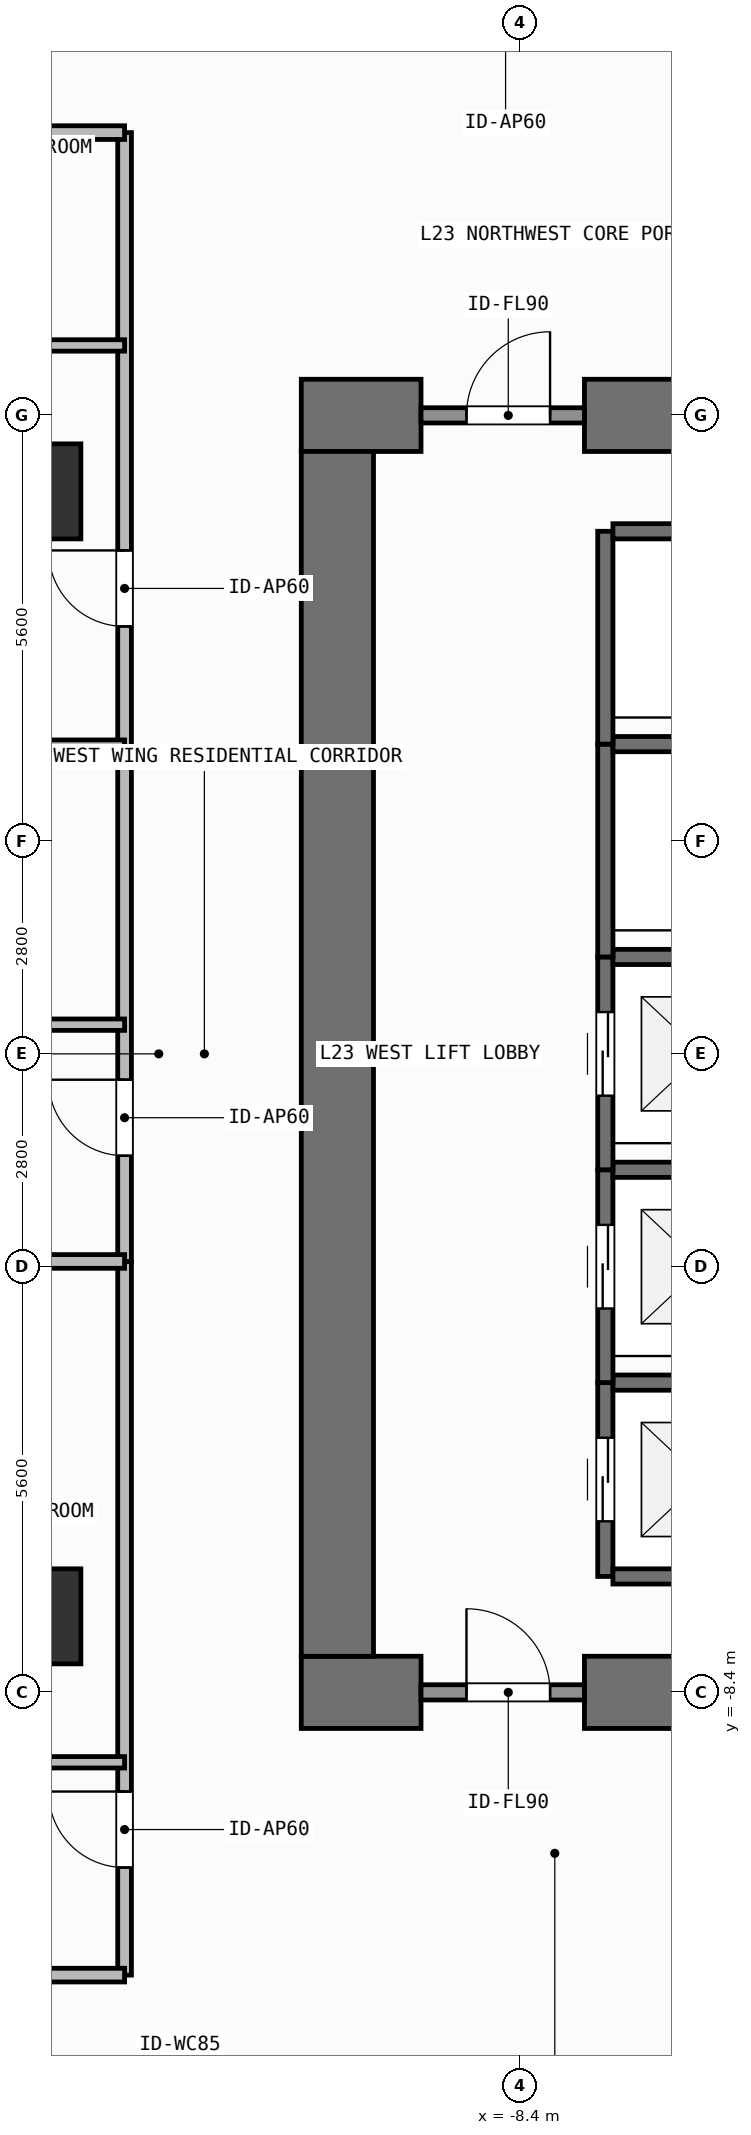
"""IFC4 building model, lengths in metres.
Left out: names, types, materials, properties, quantities, classifications, styles, units other than length and angle.
Written with IfcOpenShell. Run it as: python <this file> out.ifc"""

import sys

from ifc_helpers import new_model, si_unit, direction, frame, frame_2d, origin, origin_2d, place, context, subcontext, project, spatial, rectangle, extrude, element, fill, save


model = new_model("IFC4")
c1 = context("Model", 3, precision=1e-05, world=origin(), true_north=direction((0.0, 1.0)))
c2 = subcontext(c1, "Body", "Model", "MODEL_VIEW")
j1 = project(units=[si_unit("LENGTHUNIT", "METRE"), si_unit("PLANEANGLEUNIT", "RADIAN")], contexts=[c1])
p1 = place(None, origin())
s1 = spatial("IfcSite", under=j1, at=p1, CompositionType="ELEMENT")
p2 = place(p1, origin())
s2 = spatial("IfcBuilding", under=s1, at=p2, CompositionType="ELEMENT")
p3 = place(p2, frame((0.0, 0.0, 93.0)))
s3 = spatial("IfcBuildingStorey", under=s2, at=p3, CompositionType="ELEMENT", Elevation=93.0)
p4 = place(p3, frame((-11.275, -8.4, 0.0), z_axis=(0.0, 0.0, 1.0), x_axis=(1.0, 0.0, 0.0)))
e1 = element("IfcWall", 1, at=p4, inside=s3, PredefinedType="SHEAR", context=c2, shape_type="SweptSolid", body=[
    extrude(rectangle(XDim=1.575, YDim=0.95, at=frame_2d((0.788, 0.0))), origin(), (0.0, 0.0, 1.0), 3.9),
])
p5 = place(p3, frame((-7.55, -8.4, 0.0), z_axis=(0.0, 0.0, 1.0), x_axis=(1.0, 0.0, 0.0)))
e2 = element("IfcWall", 2, at=p5, inside=s3, PredefinedType="SHEAR", context=c2, shape_type="SweptSolid", body=[
    extrude(rectangle(XDim=3.35, YDim=0.95, at=frame_2d((1.675, 0.0))), origin(), (0.0, 0.0, 1.0), 3.9),
])
p6 = place(p3, frame((-11.275, 8.4, 0.0), z_axis=(0.0, 0.0, 1.0), x_axis=(1.0, 0.0, 0.0)))
e3 = element("IfcWall", 3, at=p6, inside=s3, PredefinedType="SHEAR", context=c2, shape_type="SweptSolid", body=[
    extrude(rectangle(XDim=1.575, YDim=0.95, at=frame_2d((0.788, 0.0))), origin(), (0.0, 0.0, 1.0), 3.9),
])
p7 = place(p3, frame((-7.55, 8.4, 0.0), z_axis=(0.0, 0.0, 1.0), x_axis=(1.0, 0.0, 0.0)))
e4 = element("IfcWall", 4, at=p7, inside=s3, PredefinedType="SHEAR", context=c2, shape_type="SweptSolid", body=[
    extrude(rectangle(XDim=16.425, YDim=0.95, at=frame_2d((8.212, 0.0))), origin(), (0.0, 0.0, 1.0), 3.9),
])
p8 = place(p3, frame((-10.8, -7.925, 0.0), z_axis=(0.0, 0.0, 1.0), x_axis=(0.0, 1.0, 0.0)))
e5 = element("IfcWall", 5, at=p8, inside=s3, PredefinedType="SHEAR", context=c2, shape_type="SweptSolid", body=[
    extrude(rectangle(XDim=15.85, YDim=0.95, at=frame_2d((7.925, 0.0))), origin(), (0.0, 0.0, 1.0), 3.9),
])
for number, where, z_axis, x_axis in (
    (6, (-14.8, -7.4, 0.0), (0.0, 0.0, 1.0), (1.0, 0.0, 0.0)),
    (7, (-14.8, 7.4, 0.0), (0.0, 0.0, 1.0), (1.0, 0.0, 0.0)),
):
    element("IfcColumn", number, at=place(p3, frame(where, z_axis=z_axis, x_axis=x_axis)), inside=s3, PredefinedType="COLUMN", context=c2, shape_type="SweptSolid", body=[
        extrude(rectangle(XDim=1.25, YDim=1.25, at=origin_2d()), origin(), (0.0, 0.0, 1.0), 3.9),
    ])
p9 = place(p3, frame((-7.275, -6.875, 0.0), z_axis=(0.0, 0.0, 1.0), x_axis=(0.0, 1.0, 0.0)))
e8 = element("IfcWall", 8, at=p9, inside=s3, PredefinedType="SHEAR", context=c2, shape_type="SweptSolid", body=[
    extrude(rectangle(XDim=2.55, YDim=0.2, at=frame_2d((1.275, 0.0))), origin(), (0.0, 0.0, 1.0), 3.68),
])
p10 = place(p9, frame((0.725, 0.0, 0.0)))
e9 = element("IfcOpeningElement", 9, at=p10, cuts=e8, PredefinedType="OPENING", context=c2, shape_type="SweptSolid", body=[
    extrude(rectangle(XDim=1.1, YDim=2.2, at=frame_2d((0.55, 1.1))), frame((0.0, 0.11, 0.0), z_axis=(0.0, -1.0, 0.0), x_axis=(1.0, 0.0, 0.0)), (0.0, 0.0, 1.0), 0.22),
])
for number, where, z_axis, x_axis in (
    (10, (-7.175, -6.875, 0.0), (0.0, 0.0, 1.0), (1.0, 0.0, 0.0)),
    (11, (-7.175, -4.325, 0.0), (0.0, 0.0, 1.0), (1.0, 0.0, 0.0)),
):
    element("IfcWall", number, at=place(p3, frame(where, z_axis=z_axis, x_axis=x_axis)), inside=s3, PredefinedType="SHEAR", context=c2, shape_type="SweptSolid", body=[
        extrude(rectangle(XDim=2.35, YDim=0.2, at=frame_2d((1.175, 0.0))), origin(), (0.0, 0.0, 1.0), 3.68),
    ])
p11 = place(p3, frame((-7.275, -4.325, 0.0), z_axis=(0.0, 0.0, 1.0), x_axis=(0.0, 1.0, 0.0)))
e12 = element("IfcWall", 12, at=p11, inside=s3, PredefinedType="SHEAR", context=c2, shape_type="SweptSolid", body=[
    extrude(rectangle(XDim=2.8, YDim=0.2, at=frame_2d((1.4, 0.0))), origin(), (0.0, 0.0, 1.0), 3.68),
])
p12 = place(p11, frame((0.975, 0.0, 0.0)))
e13 = element("IfcOpeningElement", 13, at=p12, cuts=e12, PredefinedType="OPENING", context=c2, shape_type="SweptSolid", body=[
    extrude(rectangle(XDim=1.1, YDim=2.2, at=frame_2d((0.55, 1.1))), frame((0.0, 0.11, 0.0), z_axis=(0.0, -1.0, 0.0), x_axis=(1.0, 0.0, 0.0)), (0.0, 0.0, 1.0), 0.22),
])
p13 = place(p3, frame((-7.175, -1.525, 0.0), z_axis=(0.0, 0.0, 1.0), x_axis=(1.0, 0.0, 0.0)))
e14 = element("IfcWall", 14, at=p13, inside=s3, PredefinedType="SHEAR", context=c2, shape_type="SweptSolid", body=[
    extrude(rectangle(XDim=2.35, YDim=0.2, at=frame_2d((1.175, 0.0))), origin(), (0.0, 0.0, 1.0), 3.68),
])
p14 = place(p3, frame((-7.275, -1.525, 0.0), z_axis=(0.0, 0.0, 1.0), x_axis=(0.0, 1.0, 0.0)))
e15 = element("IfcWall", 15, at=p14, inside=s3, PredefinedType="SHEAR", context=c2, shape_type="SweptSolid", body=[
    extrude(rectangle(XDim=2.8, YDim=0.2, at=frame_2d((1.4, 0.0))), origin(), (0.0, 0.0, 1.0), 3.68),
])
p15 = place(p14, frame((0.975, 0.0, 0.0)))
e16 = element("IfcOpeningElement", 16, at=p15, cuts=e15, PredefinedType="OPENING", context=c2, shape_type="SweptSolid", body=[
    extrude(rectangle(XDim=1.1, YDim=2.2, at=frame_2d((0.55, 1.1))), frame((0.0, 0.11, 0.0), z_axis=(0.0, -1.0, 0.0), x_axis=(1.0, 0.0, 0.0)), (0.0, 0.0, 1.0), 0.22),
])
p16 = place(p3, frame((-7.175, 1.275, 0.0), z_axis=(0.0, 0.0, 1.0), x_axis=(1.0, 0.0, 0.0)))
e17 = element("IfcWall", 17, at=p16, inside=s3, PredefinedType="SHEAR", context=c2, shape_type="SweptSolid", body=[
    extrude(rectangle(XDim=2.35, YDim=0.2, at=frame_2d((1.175, 0.0))), origin(), (0.0, 0.0, 1.0), 3.68),
])
p17 = place(p3, frame((-7.275, 1.275, 0.0), z_axis=(0.0, 0.0, 1.0), x_axis=(0.0, 1.0, 0.0)))
e18 = element("IfcWall", 18, at=p17, inside=s3, PredefinedType="SHEAR", context=c2, shape_type="SweptSolid", body=[
    extrude(rectangle(XDim=2.8, YDim=0.2, at=frame_2d((1.4, 0.0))), origin(), (0.0, 0.0, 1.0), 3.68),
])
p18 = place(p3, frame((-7.175, 4.075, 0.0), z_axis=(0.0, 0.0, 1.0), x_axis=(1.0, 0.0, 0.0)))
e19 = element("IfcWall", 19, at=p18, inside=s3, PredefinedType="SHEAR", context=c2, shape_type="SweptSolid", body=[
    extrude(rectangle(XDim=2.35, YDim=0.2, at=frame_2d((1.175, 0.0))), origin(), (0.0, 0.0, 1.0), 3.68),
])
p19 = place(p3, frame((-7.275, 4.075, 0.0), z_axis=(0.0, 0.0, 1.0), x_axis=(0.0, 1.0, 0.0)))
e20 = element("IfcWall", 20, at=p19, inside=s3, PredefinedType="SHEAR", context=c2, shape_type="SweptSolid", body=[
    extrude(rectangle(XDim=2.8, YDim=0.2, at=frame_2d((1.4, 0.0))), origin(), (0.0, 0.0, 1.0), 3.68),
])
p20 = place(p3, frame((-7.175, 6.875, 0.0), z_axis=(0.0, 0.0, 1.0), x_axis=(1.0, 0.0, 0.0)))
e21 = element("IfcWall", 21, at=p20, inside=s3, PredefinedType="SHEAR", context=c2, shape_type="SweptSolid", body=[
    extrude(rectangle(XDim=2.35, YDim=0.2, at=frame_2d((1.175, 0.0))), origin(), (0.0, 0.0, 1.0), 3.68),
])
p21 = place(p3, frame((-9.7, -8.4, 0.0), z_axis=(0.0, 0.0, 1.0), x_axis=(1.0, 0.0, 0.0)))
e22 = element("IfcWall", 22, at=p21, inside=s3, PredefinedType="SOLIDWALL", context=c2, shape_type="SweptSolid", body=[
    extrude(rectangle(XDim=2.15, YDim=0.2, at=frame_2d((1.075, 0.0))), origin(), (0.0, 0.0, 1.0), 2.72),
])
p22 = place(p21, frame((0.598, 0.0, 0.0)))
e23 = element("IfcOpeningElement", 23, at=p22, cuts=e22, PredefinedType="OPENING", context=c2, shape_type="SweptSolid", body=[
    extrude(rectangle(XDim=1.1, YDim=2.15, at=frame_2d((0.55, 1.075))), frame((0.0, 0.11, 0.0), z_axis=(0.0, -1.0, 0.0), x_axis=(1.0, 0.0, 0.0)), (0.0, 0.0, 1.0), 0.22),
])
p23 = place(p3, frame((-9.7, 8.4, 0.0), z_axis=(0.0, 0.0, 1.0), x_axis=(1.0, 0.0, 0.0)))
e24 = element("IfcWall", 24, at=p23, inside=s3, PredefinedType="SOLIDWALL", context=c2, shape_type="SweptSolid", body=[
    extrude(rectangle(XDim=2.15, YDim=0.2, at=frame_2d((1.075, 0.0))), origin(), (0.0, 0.0, 1.0), 2.72),
])
p24 = place(p23, frame((0.598, 0.0, 0.0)))
e25 = element("IfcOpeningElement", 25, at=p24, cuts=e24, PredefinedType="OPENING", context=c2, shape_type="SweptSolid", body=[
    extrude(rectangle(XDim=1.1, YDim=2.15, at=frame_2d((0.55, 1.075))), frame((0.0, 0.11, 0.0), z_axis=(0.0, -1.0, 0.0), x_axis=(1.0, 0.0, 0.0)), (0.0, 0.0, 1.0), 0.22),
])
p25 = place(p3, frame((-13.6, -12.12, 0.0), z_axis=(0.0, 0.0, 1.0), x_axis=(0.0, 1.0, 0.0)))
e26 = element("IfcWall", 26, at=p25, inside=s3, PredefinedType="PARTITIONING", context=c2, shape_type="SweptSolid", body=[
    extrude(rectangle(XDim=9.389, YDim=0.18, at=frame_2d((4.695, 0.0))), origin(), (0.0, 0.0, 1.0), 3.68),
])
p26 = place(p25, frame((1.415, 0.0, 0.0)))
e27 = element("IfcOpeningElement", 27, at=p26, cuts=e26, PredefinedType="OPENING", context=c2, shape_type="SweptSolid", body=[
    extrude(rectangle(XDim=1.0, YDim=2.2, at=frame_2d((0.5, 1.1))), frame((0.0, 0.1, 0.0), z_axis=(0.0, -1.0, 0.0), x_axis=(1.0, 0.0, 0.0)), (0.0, 0.0, 1.0), 0.2),
])
p27 = place(p3, frame((-16.863, -9.32, 0.0), z_axis=(0.0, 0.0, 1.0), x_axis=(1.0, 0.0, 0.0)))
e28 = element("IfcWall", 28, at=p27, inside=s3, PredefinedType="PARTITIONING", context=c2, shape_type="SweptSolid", body=[
    extrude(rectangle(XDim=3.263, YDim=0.15, at=frame_2d((1.631, 0.0))), origin(), (0.0, 0.0, 1.0), 3.68),
])
p28 = place(p27, frame((0.509, 0.0, 0.0)))
e29 = element("IfcOpeningElement", 29, at=p28, cuts=e28, PredefinedType="OPENING", context=c2, shape_type="SweptSolid", body=[
    extrude(rectangle(XDim=0.85, YDim=2.1, at=frame_2d((0.425, 1.05))), frame((0.0, 0.085, 0.0), z_axis=(0.0, -1.0, 0.0), x_axis=(1.0, 0.0, 0.0)), (0.0, 0.0, 1.0), 0.17),
])
p29 = place(p3, frame((-13.6, -2.731, 0.0), z_axis=(0.0, 0.0, 1.0), x_axis=(0.0, 1.0, 0.0)))
e30 = element("IfcWall", 30, at=p29, inside=s3, PredefinedType="PARTITIONING", context=c2, shape_type="SweptSolid", body=[
    extrude(rectangle(XDim=6.771, YDim=0.18, at=frame_2d((3.385, 0.0))), origin(), (0.0, 0.0, 1.0), 3.68),
])
p30 = place(p29, frame((1.391, 0.0, 0.0)))
e31 = element("IfcOpeningElement", 31, at=p30, cuts=e30, PredefinedType="OPENING", context=c2, shape_type="SweptSolid", body=[
    extrude(rectangle(XDim=1.0, YDim=2.2, at=frame_2d((0.5, 1.1))), frame((0.0, 0.1, 0.0), z_axis=(0.0, -1.0, 0.0), x_axis=(1.0, 0.0, 0.0)), (0.0, 0.0, 1.0), 0.2),
])
p31 = place(p3, frame((-16.902, 0.384, 0.0), z_axis=(0.0, 0.0, 1.0), x_axis=(1.0, 0.0, 0.0)))
e32 = element("IfcWall", 32, at=p31, inside=s3, PredefinedType="PARTITIONING", context=c2, shape_type="SweptSolid", body=[
    extrude(rectangle(XDim=3.302, YDim=0.15, at=frame_2d((1.651, 0.0))), origin(), (0.0, 0.0, 1.0), 3.68),
])
p32 = place(p31, frame((1.226, 0.0, 0.0)))
e33 = element("IfcOpeningElement", 33, at=p32, cuts=e32, PredefinedType="OPENING", context=c2, shape_type="SweptSolid", body=[
    extrude(rectangle(XDim=0.85, YDim=2.1, at=frame_2d((0.425, 1.05))), frame((0.0, 0.085, 0.0), z_axis=(0.0, -1.0, 0.0), x_axis=(1.0, 0.0, 0.0)), (0.0, 0.0, 1.0), 0.17),
])
p33 = place(p3, frame((-13.6, 4.04, 0.0), z_axis=(0.0, 0.0, 1.0), x_axis=(0.0, 1.0, 0.0)))
e34 = element("IfcWall", 34, at=p33, inside=s3, PredefinedType="PARTITIONING", context=c2, shape_type="SweptSolid", body=[
    extrude(rectangle(XDim=8.08, YDim=0.18, at=frame_2d((4.04, 0.0))), origin(), (0.0, 0.0, 1.0), 3.68),
])
p34 = place(p33, frame((1.583, 0.0, 0.0)))
e35 = element("IfcOpeningElement", 35, at=p34, cuts=e34, PredefinedType="OPENING", context=c2, shape_type="SweptSolid", body=[
    extrude(rectangle(XDim=1.0, YDim=2.2, at=frame_2d((0.5, 1.1))), frame((0.0, 0.1, 0.0), z_axis=(0.0, -1.0, 0.0), x_axis=(1.0, 0.0, 0.0)), (0.0, 0.0, 1.0), 0.2),
])
p35 = place(p3, frame((-16.902, 9.32, 0.0), z_axis=(0.0, 0.0, 1.0), x_axis=(1.0, 0.0, 0.0)))
e36 = element("IfcWall", 36, at=p35, inside=s3, PredefinedType="PARTITIONING", context=c2, shape_type="SweptSolid", body=[
    extrude(rectangle(XDim=3.302, YDim=0.15, at=frame_2d((1.651, 0.0))), origin(), (0.0, 0.0, 1.0), 3.68),
])
p36 = place(p35, frame((0.515, 0.0, 0.0)))
e37 = element("IfcOpeningElement", 37, at=p36, cuts=e36, PredefinedType="OPENING", context=c2, shape_type="SweptSolid", body=[
    extrude(rectangle(XDim=0.85, YDim=2.1, at=frame_2d((0.425, 1.05))), frame((0.0, 0.085, 0.0), z_axis=(0.0, -1.0, 0.0), x_axis=(1.0, 0.0, 0.0)), (0.0, 0.0, 1.0), 0.17),
])
for number, where, z_axis, x_axis in (
    (38, (-27.93, -2.731, 0.0), (0.0, 0.0, 1.0), (1.0, 0.0, 0.0)),
    (39, (-27.93, 4.04, 0.0), (0.0, 0.0, 1.0), (1.0, 0.0, 0.0)),
    (40, (-27.93, -12.12, 0.0), (0.0, 0.0, 1.0), (1.0, 0.0, 0.0)),
    (41, (-27.93, 12.12, 0.0), (0.0, 0.0, 1.0), (1.0, 0.0, 0.0)),
):
    element("IfcWall", number, at=place(p3, frame(where, z_axis=z_axis, x_axis=x_axis)), inside=s3, PredefinedType="PARTITIONING", context=c2, shape_type="SweptSolid", body=[
        extrude(rectangle(XDim=14.33, YDim=0.18, at=frame_2d((7.165, 0.0))), origin(), (0.0, 0.0, 1.0), 3.68),
    ])
p37 = place(p10, origin())
e42 = element("IfcDoor", 42, at=p37, inside=s3, OperationType="SLIDING_TO_LEFT", PredefinedType="DOOR", context=c2, shape_type="SweptSolid", body=[
    extrude(rectangle(XDim=1.1, YDim=2.2, at=frame_2d((0.55, 1.1))), frame((0.0, 0.025, 0.0), z_axis=(0.0, -1.0, 0.0), x_axis=(1.0, 0.0, 0.0)), (0.0, 0.0, 1.0), 0.05),
])
fill(e9, e42)
p38 = place(p12, origin())
e43 = element("IfcDoor", 43, at=p38, inside=s3, OperationType="SLIDING_TO_LEFT", PredefinedType="DOOR", context=c2, shape_type="SweptSolid", body=[
    extrude(rectangle(XDim=1.1, YDim=2.2, at=frame_2d((0.55, 1.1))), frame((0.0, 0.025, 0.0), z_axis=(0.0, -1.0, 0.0), x_axis=(1.0, 0.0, 0.0)), (0.0, 0.0, 1.0), 0.05),
])
fill(e13, e43)
p39 = place(p15, origin())
e44 = element("IfcDoor", 44, at=p39, inside=s3, OperationType="SLIDING_TO_LEFT", PredefinedType="DOOR", context=c2, shape_type="SweptSolid", body=[
    extrude(rectangle(XDim=1.1, YDim=2.2, at=frame_2d((0.55, 1.1))), frame((0.0, 0.025, 0.0), z_axis=(0.0, -1.0, 0.0), x_axis=(1.0, 0.0, 0.0)), (0.0, 0.0, 1.0), 0.05),
])
fill(e16, e44)
p40 = place(p22, origin())
e45 = element("IfcDoor", 45, at=p40, inside=s3, OperationType="SINGLE_SWING_LEFT", PredefinedType="DOOR", context=c2, shape_type="SweptSolid", body=[
    extrude(rectangle(XDim=1.1, YDim=2.15, at=frame_2d((0.55, 1.075))), frame((0.0, 0.025, 0.0), z_axis=(0.0, -1.0, 0.0), x_axis=(1.0, 0.0, 0.0)), (0.0, 0.0, 1.0), 0.05),
])
fill(e23, e45)
p41 = place(p24, origin())
e46 = element("IfcDoor", 46, at=p41, inside=s3, OperationType="SINGLE_SWING_RIGHT", PredefinedType="DOOR", context=c2, shape_type="SweptSolid", body=[
    extrude(rectangle(XDim=1.1, YDim=2.15, at=frame_2d((0.55, 1.075))), frame((0.0, 0.025, 0.0), z_axis=(0.0, -1.0, 0.0), x_axis=(1.0, 0.0, 0.0)), (0.0, 0.0, 1.0), 0.05),
])
fill(e25, e46)
p42 = place(p26, origin())
e47 = element("IfcDoor", 47, at=p42, inside=s3, OperationType="SINGLE_SWING_RIGHT", PredefinedType="DOOR", context=c2, shape_type="SweptSolid", body=[
    extrude(rectangle(XDim=1.0, YDim=2.2, at=frame_2d((0.5, 1.1))), frame((0.0, 0.025, 0.0), z_axis=(0.0, -1.0, 0.0), x_axis=(1.0, 0.0, 0.0)), (0.0, 0.0, 1.0), 0.05),
])
fill(e27, e47)
p43 = place(p30, origin())
e48 = element("IfcDoor", 48, at=p43, inside=s3, OperationType="SINGLE_SWING_RIGHT", PredefinedType="DOOR", context=c2, shape_type="SweptSolid", body=[
    extrude(rectangle(XDim=1.0, YDim=2.2, at=frame_2d((0.5, 1.1))), frame((0.0, 0.025, 0.0), z_axis=(0.0, -1.0, 0.0), x_axis=(1.0, 0.0, 0.0)), (0.0, 0.0, 1.0), 0.05),
])
fill(e31, e48)
p44 = place(p34, origin())
e49 = element("IfcDoor", 49, at=p44, inside=s3, OperationType="SINGLE_SWING_RIGHT", PredefinedType="DOOR", context=c2, shape_type="SweptSolid", body=[
    extrude(rectangle(XDim=1.0, YDim=2.2, at=frame_2d((0.5, 1.1))), frame((0.0, 0.025, 0.0), z_axis=(0.0, -1.0, 0.0), x_axis=(1.0, 0.0, 0.0)), (0.0, 0.0, 1.0), 0.05),
])
fill(e35, e49)
save(model, sys.argv[1])
